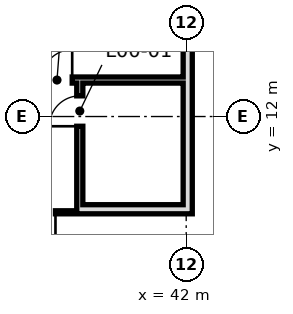
"""IFC4 building model, lengths in metres.
Left out: names, types, materials, properties, quantities, classifications, styles, units other than length and angle.
Written with IfcOpenShell. Run it as: python <this file> out.ifc"""

import sys

from ifc_helpers import new_model, si_unit, direction, frame, frame_2d, origin, place, context, subcontext, project, spatial, rectangle, extrude, element, fill, save


model = new_model("IFC4")
c1 = context("Model", 3, precision=1e-05, world=origin(), true_north=direction((0.0, 1.0)))
c2 = subcontext(c1, "Body", "Model", "MODEL_VIEW")
j1 = project(units=[si_unit("LENGTHUNIT", "METRE"), si_unit("PLANEANGLEUNIT", "RADIAN")], contexts=[c1])
p1 = place(None, origin())
s1 = spatial("IfcSite", under=j1, at=p1, CompositionType="ELEMENT")
p2 = place(p1, origin())
s2 = spatial("IfcBuilding", under=s1, at=p2, CompositionType="ELEMENT")
p3 = place(p2, origin())
s3 = spatial("IfcBuildingStorey", under=s2, at=p3, CompositionType="ELEMENT", Elevation=0.0)
p4 = place(p3, frame((42.15, 8.9, 0.0), z_axis=(0.0, 0.0, 1.0), x_axis=(0.0, 1.0, 0.0)))
e1 = element("IfcWall", 1, at=p4, inside=s3, PredefinedType="SOLIDWALL", context=c2, shape_type="SweptSolid", body=[
    extrude(rectangle(XDim=12.7, YDim=0.1, at=frame_2d((6.35, 0.0))), origin(), (0.0, 0.0, 1.0), 13.83),
])
p5 = place(p4, frame((9.4, 0.0, 0.0)))
e2 = element("IfcOpeningElement", 2, at=p5, cuts=e1, PredefinedType="OPENING", context=c2, shape_type="SweptSolid", body=[
    extrude(rectangle(XDim=2.4, YDim=2.6, at=frame_2d((1.2, 1.3))), frame((0.0, 0.06, 0.0), z_axis=(0.0, -1.0, 0.0), x_axis=(1.0, 0.0, 0.0)), (0.0, 0.0, 1.0), 0.12),
])
p6 = place(p3, frame((8.9, 8.85, 0.0), z_axis=(0.0, 0.0, 1.0), x_axis=(1.0, 0.0, 0.0)))
e3 = element("IfcWall", 3, at=p6, inside=s3, PredefinedType="SOLIDWALL", context=c2, shape_type="SweptSolid", body=[
    extrude(rectangle(XDim=33.3, YDim=0.1, at=frame_2d((16.65, 0.0))), origin(), (0.0, 0.0, 1.0), 13.83),
])
p7 = place(p6, frame((1.4, 0.0, 0.0)))
e4 = element("IfcOpeningElement", 4, at=p7, cuts=e3, PredefinedType="OPENING", context=c2, shape_type="SweptSolid", body=[
    extrude(rectangle(XDim=2.4, YDim=2.6, at=frame_2d((1.2, 1.3))), frame((0.0, 0.06, 0.0), z_axis=(0.0, -1.0, 0.0), x_axis=(1.0, 0.0, 0.0)), (0.0, 0.0, 1.0), 0.12),
])
p8 = place(p6, frame((4.525, 0.0, 0.0)))
e5 = element("IfcOpeningElement", 5, at=p8, cuts=e3, PredefinedType="OPENING", context=c2, shape_type="SweptSolid", body=[
    extrude(rectangle(XDim=2.4, YDim=2.6, at=frame_2d((1.2, 1.3))), frame((0.0, 0.06, 0.0), z_axis=(0.0, -1.0, 0.0), x_axis=(1.0, 0.0, 0.0)), (0.0, 0.0, 1.0), 0.12),
])
p9 = place(p6, frame((7.65, 0.0, 0.0)))
e6 = element("IfcOpeningElement", 6, at=p9, cuts=e3, PredefinedType="OPENING", context=c2, shape_type="SweptSolid", body=[
    extrude(rectangle(XDim=2.4, YDim=2.6, at=frame_2d((1.2, 1.3))), frame((0.0, 0.06, 0.0), z_axis=(0.0, -1.0, 0.0), x_axis=(1.0, 0.0, 0.0)), (0.0, 0.0, 1.0), 0.12),
])
p10 = place(p6, frame((10.775, 0.0, 0.0)))
e7 = element("IfcOpeningElement", 7, at=p10, cuts=e3, PredefinedType="OPENING", context=c2, shape_type="SweptSolid", body=[
    extrude(rectangle(XDim=2.4, YDim=2.6, at=frame_2d((1.2, 1.3))), frame((0.0, 0.06, 0.0), z_axis=(0.0, -1.0, 0.0), x_axis=(1.0, 0.0, 0.0)), (0.0, 0.0, 1.0), 0.12),
])
p11 = place(p6, frame((13.9, 0.0, 0.0)))
e8 = element("IfcOpeningElement", 8, at=p11, cuts=e3, PredefinedType="OPENING", context=c2, shape_type="SweptSolid", body=[
    extrude(rectangle(XDim=2.4, YDim=2.6, at=frame_2d((1.2, 1.3))), frame((0.0, 0.06, 0.0), z_axis=(0.0, -1.0, 0.0), x_axis=(1.0, 0.0, 0.0)), (0.0, 0.0, 1.0), 0.12),
])
p12 = place(p6, frame((17.025, 0.0, 0.0)))
e9 = element("IfcOpeningElement", 9, at=p12, cuts=e3, PredefinedType="OPENING", context=c2, shape_type="SweptSolid", body=[
    extrude(rectangle(XDim=2.4, YDim=2.6, at=frame_2d((1.2, 1.3))), frame((0.0, 0.06, 0.0), z_axis=(0.0, -1.0, 0.0), x_axis=(1.0, 0.0, 0.0)), (0.0, 0.0, 1.0), 0.12),
])
p13 = place(p6, frame((20.15, 0.0, 0.0)))
e10 = element("IfcOpeningElement", 10, at=p13, cuts=e3, PredefinedType="OPENING", context=c2, shape_type="SweptSolid", body=[
    extrude(rectangle(XDim=2.4, YDim=2.6, at=frame_2d((1.2, 1.3))), frame((0.0, 0.06, 0.0), z_axis=(0.0, -1.0, 0.0), x_axis=(1.0, 0.0, 0.0)), (0.0, 0.0, 1.0), 0.12),
])
p14 = place(p6, frame((23.275, 0.0, 0.0)))
e11 = element("IfcOpeningElement", 11, at=p14, cuts=e3, PredefinedType="OPENING", context=c2, shape_type="SweptSolid", body=[
    extrude(rectangle(XDim=2.4, YDim=2.6, at=frame_2d((1.2, 1.3))), frame((0.0, 0.06, 0.0), z_axis=(0.0, -1.0, 0.0), x_axis=(1.0, 0.0, 0.0)), (0.0, 0.0, 1.0), 0.12),
])
p15 = place(p6, frame((26.4, 0.0, 0.0)))
e12 = element("IfcOpeningElement", 12, at=p15, cuts=e3, PredefinedType="OPENING", context=c2, shape_type="SweptSolid", body=[
    extrude(rectangle(XDim=2.4, YDim=2.6, at=frame_2d((1.2, 1.3))), frame((0.0, 0.06, 0.0), z_axis=(0.0, -1.0, 0.0), x_axis=(1.0, 0.0, 0.0)), (0.0, 0.0, 1.0), 0.12),
])
p16 = place(p3, frame((38.5, 8.9, 0.0), z_axis=(0.0, 0.0, 1.0), x_axis=(0.0, 1.0, 0.0)))
e13 = element("IfcWall", 13, at=p16, inside=s3, PredefinedType="SOLIDWALL", context=c2, shape_type="SweptSolid", body=[
    extrude(rectangle(XDim=4.2, YDim=0.2, at=frame_2d((2.1, 0.0))), origin(), (0.0, 0.0, 1.0), 13.85),
])
p17 = place(p16, frame((2.78, 0.0, 0.0)))
e14 = element("IfcOpeningElement", 14, at=p17, cuts=e13, PredefinedType="OPENING", context=c2, shape_type="SweptSolid", body=[
    extrude(rectangle(XDim=1.0, YDim=2.4, at=frame_2d((0.5, 1.2))), frame((0.0, 0.11, 0.0), z_axis=(0.0, -1.0, 0.0), x_axis=(1.0, 0.0, 0.0)), (0.0, 0.0, 1.0), 0.22),
])
p18 = place(p3, frame((42.0, 8.9, 0.0), z_axis=(0.0, 0.0, 1.0), x_axis=(0.0, 1.0, 0.0)))
e15 = element("IfcWall", 15, at=p18, inside=s3, PredefinedType="SOLIDWALL", context=c2, shape_type="SweptSolid", body=[
    extrude(rectangle(XDim=8.6, YDim=0.2, at=frame_2d((4.3, 0.0))), origin(), (0.0, 0.0, 1.0), 13.85),
])
p19 = place(p3, frame((38.6, 9.0, 0.0), z_axis=(0.0, 0.0, 1.0), x_axis=(1.0, 0.0, 0.0)))
e16 = element("IfcWall", 16, at=p19, inside=s3, PredefinedType="SOLIDWALL", context=c2, shape_type="SweptSolid", body=[
    extrude(rectangle(XDim=3.3, YDim=0.2, at=frame_2d((1.65, 0.0))), origin(), (0.0, 0.0, 1.0), 14.55),
])
p20 = place(p3, frame((25.075, 13.2, 0.0), z_axis=(0.0, 0.0, 1.0), x_axis=(1.0, 0.0, 0.0)))
e17 = element("IfcWall", 17, at=p20, inside=s3, PredefinedType="SOLIDWALL", context=c2, shape_type="SweptSolid", body=[
    extrude(rectangle(XDim=16.825, YDim=0.2, at=frame_2d((8.413, 0.0))), origin(), (0.0, 0.0, 1.0), 13.85),
])
p21 = place(p20, frame((12.175, 0.0, 0.0)))
e18 = element("IfcOpeningElement", 18, at=p21, cuts=e17, PredefinedType="OPENING", context=c2, shape_type="SweptSolid", body=[
    extrude(rectangle(XDim=1.0, YDim=2.4, at=frame_2d((0.5, 1.2))), frame((0.0, 0.11, 0.0), z_axis=(0.0, -1.0, 0.0), x_axis=(1.0, 0.0, 0.0)), (0.0, 0.0, 1.0), 0.22),
])
p22 = place(p20, frame((7.875, 0.0, 0.0)))
e19 = element("IfcOpeningElement", 19, at=p22, cuts=e17, PredefinedType="OPENING", context=c2, shape_type="SweptSolid", body=[
    extrude(rectangle(XDim=1.0, YDim=2.4, at=frame_2d((0.5, 1.2))), frame((0.0, 0.11, 0.0), z_axis=(0.0, -1.0, 0.0), x_axis=(1.0, 0.0, 0.0)), (0.0, 0.0, 1.0), 0.22),
])
p23 = place(p15, frame((2.4, 0.0, 0.0), z_axis=(0.0, 0.0, 1.0), x_axis=(-1.0, 0.0, 0.0)))
e20 = element("IfcDoor", 20, at=p23, inside=s3, OperationType="DOUBLE_DOOR_SINGLE_SWING", PredefinedType="DOOR", context=c2, shape_type="SweptSolid", body=[
    extrude(rectangle(XDim=2.4, YDim=2.6, at=frame_2d((1.2, 1.3))), frame((0.0, 0.025, 0.0), z_axis=(0.0, -1.0, 0.0), x_axis=(1.0, 0.0, 0.0)), (0.0, 0.0, 1.0), 0.05),
])
fill(e12, e20)
p24 = place(p17, origin())
e21 = element("IfcDoor", 21, at=p24, inside=s3, OperationType="SINGLE_SWING_LEFT", PredefinedType="DOOR", context=c2, shape_type="SweptSolid", body=[
    extrude(rectangle(XDim=1.0, YDim=2.4, at=frame_2d((0.5, 1.2))), frame((0.0, 0.025, 0.0), z_axis=(0.0, -1.0, 0.0), x_axis=(1.0, 0.0, 0.0)), (0.0, 0.0, 1.0), 0.05),
])
fill(e14, e21)
p25 = place(p21, frame((1.0, 0.0, 0.0), z_axis=(0.0, 0.0, 1.0), x_axis=(-1.0, 0.0, 0.0)))
e22 = element("IfcDoor", 22, at=p25, inside=s3, OperationType="SINGLE_SWING_LEFT", PredefinedType="DOOR", context=c2, shape_type="SweptSolid", body=[
    extrude(rectangle(XDim=1.0, YDim=2.4, at=frame_2d((0.5, 1.2))), frame((0.0, 0.025, 0.0), z_axis=(0.0, -1.0, 0.0), x_axis=(1.0, 0.0, 0.0)), (0.0, 0.0, 1.0), 0.05),
])
fill(e18, e22)
save(model, sys.argv[1])
